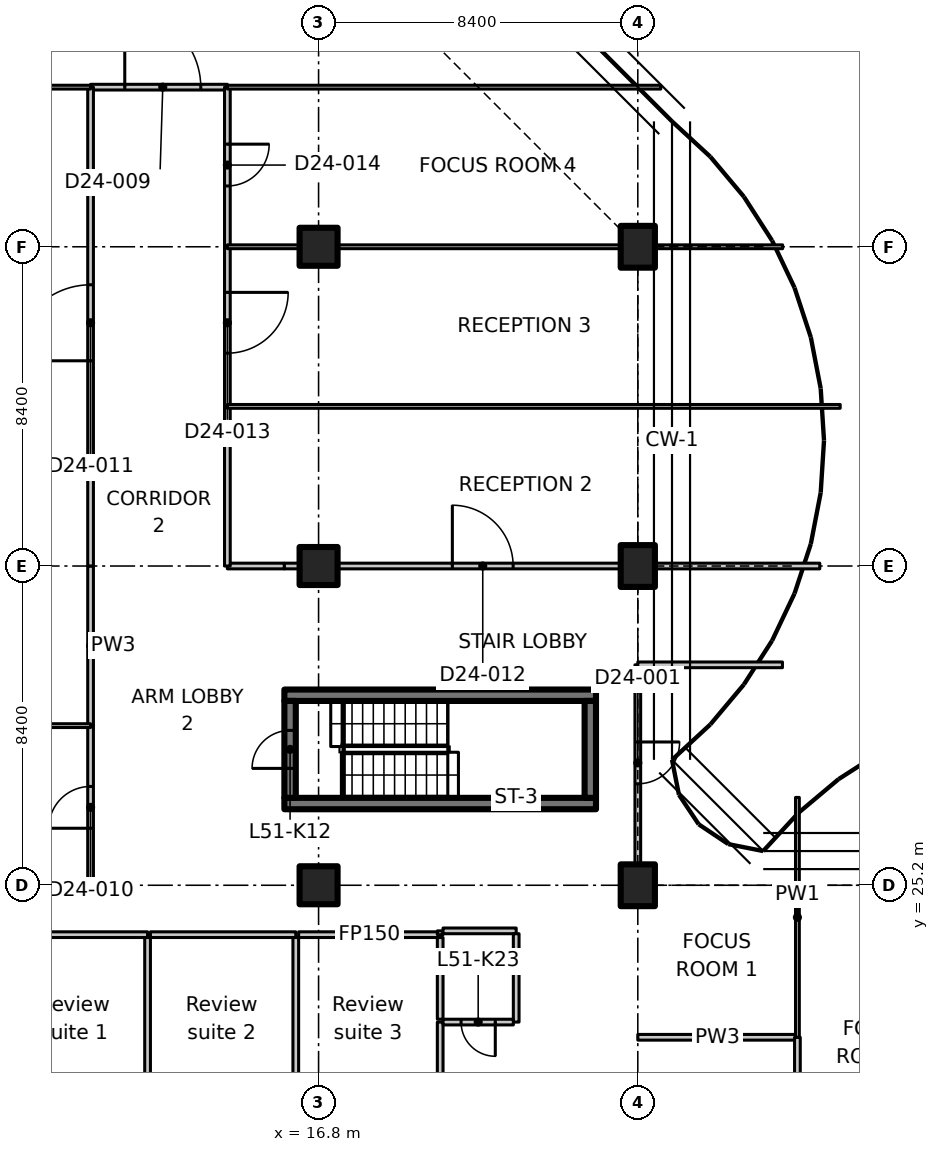
"""IFC4 building model, lengths in metres.
Left out: names, types, materials, properties, quantities, classifications, styles, units other than length and angle.
Written with IfcOpenShell. Run it as: python <this file> out.ifc"""

import sys

from ifc_helpers import new_model, si_unit, direction, frame, frame_2d, origin, origin_2d, place, context, subcontext, project, spatial, polyline, rectangle, outline, extrude, element, fill, save


model = new_model("IFC4")
c1 = context("Model", 3, precision=1e-05, world=origin(), true_north=direction((0.0, 1.0)))
c2 = subcontext(c1, "Body", "Model", "MODEL_VIEW")
j1 = project(units=[si_unit("LENGTHUNIT", "METRE"), si_unit("PLANEANGLEUNIT", "RADIAN")], contexts=[c1])
p1 = place(None, origin())
s1 = spatial("IfcSite", under=j1, at=p1, CompositionType="ELEMENT")
p2 = place(p1, origin())
s2 = spatial("IfcBuilding", under=s1, at=p2, CompositionType="ELEMENT")
p3 = place(p2, frame((0.0, 0.0, 202.8)))
s3 = spatial("IfcBuildingStorey", under=s2, at=p3, CompositionType="ELEMENT", Elevation=202.8)
for number, where, z_axis, x_axis in (
    (1, (16.8, 25.2, 0.0), (0.0, 0.0, 1.0), (1.0, 0.0, 0.0)),
    (2, (16.8, 33.6, 0.0), (0.0, 0.0, 1.0), (1.0, 0.0, 0.0)),
    (3, (16.8, 42.0, 0.0), (0.0, 0.0, 1.0), (1.0, 0.0, 0.0)),
):
    element("IfcColumn", number, at=place(p3, frame(where, z_axis=z_axis, x_axis=x_axis)), inside=s3, PredefinedType="COLUMN", context=c2, shape_type="SweptSolid", body=[
        extrude(rectangle(XDim=1.0, YDim=1.0, at=origin_2d()), origin(), (0.0, 0.0, 1.0), 3.3),
    ])
for number, where, z_axis, x_axis in (
    (4, (25.2, 25.2, 0.0), (0.0, 0.0, 1.0), (1.0, 0.0, 0.0)),
    (5, (25.2, 33.6, 0.0), (0.0, 0.0, 1.0), (1.0, 0.0, 0.0)),
    (6, (25.2, 42.0, 0.0), (0.0, 0.0, 1.0), (1.0, 0.0, 0.0)),
):
    element("IfcColumn", number, at=place(p3, frame(where, z_axis=z_axis, x_axis=x_axis)), inside=s3, PredefinedType="COLUMN", context=c2, shape_type="SweptSolid", body=[
        extrude(rectangle(XDim=0.9, YDim=1.1, at=origin_2d()), origin(), (0.0, 0.0, 1.0), 3.3),
    ])
for number, where, z_axis, x_axis in (
    (7, (15.9, 27.35, 0.0), (0.0, 0.0, 1.0), (1.0, 0.0, 0.0)),
    (8, (15.9, 30.2, 0.0), (0.0, 0.0, 1.0), (1.0, 0.0, 0.0)),
):
    element("IfcWall", number, at=place(p3, frame(where, z_axis=z_axis, x_axis=x_axis)), inside=s3, PredefinedType="SHEAR", context=c2, shape_type="SweptSolid", body=[
        extrude(rectangle(XDim=8.2, YDim=0.3, at=frame_2d((4.1, 0.0))), origin(), (0.0, 0.0, 1.0), 3.3),
    ])
p4 = place(p3, frame((16.05, 27.5, 0.0), z_axis=(0.0, 0.0, 1.0), x_axis=(0.0, 1.0, 0.0)))
e9 = element("IfcWall", 9, at=p4, inside=s3, PredefinedType="SHEAR", context=c2, shape_type="SweptSolid", body=[
    extrude(rectangle(XDim=2.55, YDim=0.3, at=frame_2d((1.275, 0.0))), origin(), (0.0, 0.0, 1.0), 3.3),
])
p5 = place(p4, frame((0.775, 0.0, 0.0)))
e10 = element("IfcOpeningElement", 10, at=p5, cuts=e9, PredefinedType="OPENING", context=c2, shape_type="SweptSolid", body=[
    extrude(rectangle(XDim=1.0, YDim=2.1, at=frame_2d((0.5, 1.05))), frame((0.0, 0.16, 0.0), z_axis=(0.0, -1.0, 0.0), x_axis=(1.0, 0.0, 0.0)), (0.0, 0.0, 1.0), 0.32),
])
p6 = place(p3, frame((23.95, 27.5, 0.0), z_axis=(0.0, 0.0, 1.0), x_axis=(0.0, 1.0, 0.0)))
e11 = element("IfcWall", 11, at=p6, inside=s3, PredefinedType="SHEAR", context=c2, shape_type="SweptSolid", body=[
    extrude(rectangle(XDim=2.55, YDim=0.3, at=frame_2d((1.275, 0.0))), origin(), (0.0, 0.0, 1.0), 3.3),
])
p7 = place(p3, frame((8.575, 23.9, 0.0), z_axis=(0.0, 0.0, 1.0), x_axis=(1.0, 0.0, 0.0)))
e12 = element("IfcWall", 12, at=p7, inside=s3, PredefinedType="PARTITIONING", context=c2, shape_type="SweptSolid", body=[
    extrude(rectangle(XDim=3.725, YDim=0.15, at=frame_2d((1.863, 0.0))), origin(), (0.0, 0.0, 1.0), 3.3),
])
p8 = place(p3, frame((12.3, 23.825, 0.0), z_axis=(0.0, 0.0, 1.0), x_axis=(0.0, -1.0, 0.0)))
e13 = element("IfcWall", 13, at=p8, inside=s3, PredefinedType="PARTITIONING", context=c2, shape_type="SweptSolid", body=[
    extrude(rectangle(XDim=4.35, YDim=0.15, at=frame_2d((2.175, 0.0))), origin(), (0.0, 0.0, 1.0), 3.3),
])
p9 = place(p3, frame((12.375, 23.9, 0.0), z_axis=(0.0, 0.0, 1.0), x_axis=(1.0, 0.0, 0.0)))
e14 = element("IfcWall", 14, at=p9, inside=s3, PredefinedType="PARTITIONING", context=c2, shape_type="SweptSolid", body=[
    extrude(rectangle(XDim=3.825, YDim=0.15, at=frame_2d((1.913, 0.0))), origin(), (0.0, 0.0, 1.0), 3.3),
])
p10 = place(p3, frame((20.0, 21.6, 0.0), z_axis=(0.0, 0.0, 1.0), x_axis=(0.0, -1.0, 0.0)))
e15 = element("IfcWall", 15, at=p10, inside=s3, PredefinedType="PARTITIONING", context=c2, shape_type="SweptSolid", body=[
    extrude(rectangle(XDim=2.2, YDim=0.15, at=frame_2d((1.1, 0.0))), origin(), (0.0, 0.0, 1.0), 3.3),
])
p11 = place(p3, frame((16.2, 23.825, 0.0), z_axis=(0.0, 0.0, 1.0), x_axis=(0.0, -1.0, 0.0)))
e16 = element("IfcWall", 16, at=p11, inside=s3, PredefinedType="PARTITIONING", context=c2, shape_type="SweptSolid", body=[
    extrude(rectangle(XDim=4.35, YDim=0.15, at=frame_2d((2.175, 0.0))), origin(), (0.0, 0.0, 1.0), 3.3),
])
p12 = place(p3, frame((16.275, 23.9, 0.0), z_axis=(0.0, 0.0, 1.0), x_axis=(1.0, 0.0, 0.0)))
e17 = element("IfcWall", 17, at=p12, inside=s3, PredefinedType="PARTITIONING", context=c2, shape_type="SweptSolid", body=[
    extrude(rectangle(XDim=3.725, YDim=0.15, at=frame_2d((1.863, 0.0))), origin(), (0.0, 0.0, 1.0), 3.3),
])
p13 = place(p3, frame((20.0, 23.9, 0.0), z_axis=(0.0, 0.0, 1.0), x_axis=(0.0, 1.0, 0.0)))
e18 = element("IfcWall", 18, at=p13, inside=s3, PredefinedType="PARTITIONING", context=c2, shape_type="SweptSolid", body=[
    extrude(rectangle(XDim=0.1, YDim=0.15, at=frame_2d((0.05, 0.0))), origin(), (0.0, 0.0, 1.0), 3.3),
])
p14 = place(p3, frame((20.075, 24.0, 0.0), z_axis=(0.0, 0.0, 1.0), x_axis=(1.0, 0.0, 0.0)))
e19 = element("IfcWall", 19, at=p14, inside=s3, PredefinedType="PARTITIONING", context=c2, shape_type="SweptSolid", body=[
    extrude(rectangle(XDim=1.925, YDim=0.15, at=frame_2d((0.962, 0.0))), origin(), (0.0, 0.0, 1.0), 3.3),
])
p15 = place(p3, frame((22.0, 23.925, 0.0), z_axis=(0.0, 0.0, 1.0), x_axis=(0.0, -1.0, 0.0)))
e20 = element("IfcWall", 20, at=p15, inside=s3, PredefinedType="PARTITIONING", context=c2, shape_type="SweptSolid", body=[
    extrude(rectangle(XDim=2.325, YDim=0.15, at=frame_2d((1.163, 0.0))), origin(), (0.0, 0.0, 1.0), 3.3),
])
p16 = place(p3, frame((21.925, 21.6, 0.0), z_axis=(0.0, 0.0, 1.0), x_axis=(-1.0, 0.0, 0.0)))
e21 = element("IfcWall", 21, at=p16, inside=s3, PredefinedType="PARTITIONING", context=c2, shape_type="SweptSolid", body=[
    extrude(rectangle(XDim=1.85, YDim=0.15, at=frame_2d((0.925, 0.0))), origin(), (0.0, 0.0, 1.0), 3.3),
])
p17 = place(p16, frame((0.475, 0.0, 0.0)))
e22 = element("IfcOpeningElement", 22, at=p17, cuts=e21, PredefinedType="OPENING", context=c2, shape_type="SweptSolid", body=[
    extrude(rectangle(XDim=0.9, YDim=2.1, at=frame_2d((0.45, 1.05))), frame((0.0, 0.085, 0.0), z_axis=(0.0, -1.0, 0.0), x_axis=(1.0, 0.0, 0.0)), (0.0, 0.0, 1.0), 0.17),
])
p18 = place(p3, frame((20.0, 21.675, 0.0), z_axis=(0.0, 0.0, 1.0), x_axis=(0.0, 1.0, 0.0)))
e23 = element("IfcWall", 23, at=p18, inside=s3, PredefinedType="PARTITIONING", context=c2, shape_type="SweptSolid", body=[
    extrude(rectangle(XDim=2.15, YDim=0.15, at=frame_2d((1.075, 0.0))), origin(), (0.0, 0.0, 1.0), 3.3),
])
p19 = place(p3, frame((25.2, 21.2, 0.0), z_axis=(0.0, 0.0, 1.0), x_axis=(1.0, 0.0, 0.0)))
e24 = element("IfcWall", 24, at=p19, inside=s3, PredefinedType="PARTITIONING", context=c2, shape_type="SweptSolid", body=[
    extrude(rectangle(XDim=4.2, YDim=0.15, at=frame_2d((2.1, 0.0))), origin(), (0.0, 0.0, 1.0), 3.28),
])
p20 = place(p3, frame((29.4, 21.2, 0.0), z_axis=(0.0, 0.0, 1.0), x_axis=(0.0, -1.0, 0.0)))
e25 = element("IfcWall", 25, at=p20, inside=s3, PredefinedType="PARTITIONING", context=c2, shape_type="SweptSolid", body=[
    extrude(rectangle(XDim=8.2, YDim=0.15, at=frame_2d((4.1, 0.0))), origin(), (0.0, 0.0, 1.0), 3.28),
])
p21 = place(p3, frame((29.4, 27.511, 0.0), z_axis=(0.0, 0.0, 1.0), x_axis=(0.0, -1.0, 0.0)))
e26 = element("IfcWall", 26, at=p21, inside=s3, PredefinedType="PARTITIONING", context=c2, shape_type="SweptSolid", body=[
    extrude(outline(polyline([(0.0, 0.0), (6.311, 0.0), (6.311, 3.28), (2.761, 3.28), (2.759, 2.93), (1.863, 2.93), (1.861, 3.28), (0.236, 3.28), (0.0, 3.28), (0.0, 0.0)])), frame((0.0, 0.05, 0.0), z_axis=(0.0, -1.0, 0.0), x_axis=(1.0, 0.0, 0.0)), (0.0, 0.0, 1.0), 0.1),
])
p22 = place(p3, frame((25.2, 31.0, 0.0), z_axis=(0.0, 0.0, 1.0), x_axis=(0.0, -1.0, 0.0)))
e27 = element("IfcWall", 27, at=p22, inside=s3, PredefinedType="PARTITIONING", context=c2, shape_type="SweptSolid", body=[
    extrude(outline(polyline([(0.0, 0.0), (5.23, 0.0), (5.23, 2.93), (0.0, 2.93), (0.0, 0.0)])), frame((0.0, 0.075, 0.0), z_axis=(0.0, -1.0, 0.0), x_axis=(1.0, 0.0, 0.0)), (0.0, 0.0, 1.0), 0.15),
])
p23 = place(p22, frame((2.03, 0.0, 0.0)))
e28 = element("IfcOpeningElement", 28, at=p23, cuts=e27, PredefinedType="OPENING", context=c2, shape_type="SweptSolid", body=[
    extrude(rectangle(XDim=1.1, YDim=2.1, at=frame_2d((0.55, 1.05))), frame((0.0, 0.085, 0.0), z_axis=(0.0, -1.0, 0.0), x_axis=(1.0, 0.0, 0.0)), (0.0, 0.0, 1.0), 0.17),
])
p24 = place(p3, frame((25.2, 31.0, 0.0), z_axis=(0.0, 0.0, 1.0), x_axis=(1.0, 0.0, 0.0)))
e29 = element("IfcWall", 29, at=p24, inside=s3, PredefinedType="PARTITIONING", context=c2, shape_type="SweptSolid", body=[
    extrude(rectangle(XDim=3.806, YDim=0.15, at=frame_2d((1.903, 0.0))), origin(), (0.0, 0.0, 1.0), 2.93),
])
p25 = place(p3, frame((10.8, 25.2, 0.0), z_axis=(0.0, 0.0, 1.0), x_axis=(0.0, 1.0, 0.0)))
e30 = element("IfcWall", 30, at=p25, inside=s3, PredefinedType="PARTITIONING", context=c2, shape_type="SweptSolid", body=[
    extrude(rectangle(XDim=4.2, YDim=0.15, at=frame_2d((2.1, 0.0))), origin(), (0.0, 0.0, 1.0), 3.28),
])
p26 = place(p25, frame((1.5, 0.0, 0.0)))
e31 = element("IfcOpeningElement", 31, at=p26, cuts=e30, PredefinedType="OPENING", context=c2, shape_type="SweptSolid", body=[
    extrude(rectangle(XDim=1.1, YDim=2.1, at=frame_2d((0.55, 1.05))), frame((0.0, 0.085, 0.0), z_axis=(0.0, -1.0, 0.0), x_axis=(1.0, 0.0, 0.0)), (0.0, 0.0, 1.0), 0.17),
])
p27 = place(p3, frame((10.8, 29.4, 0.0), z_axis=(0.0, 0.0, 1.0), x_axis=(0.0, 1.0, 0.0)))
e32 = element("IfcWall", 32, at=p27, inside=s3, PredefinedType="PARTITIONING", context=c2, shape_type="SweptSolid", body=[
    extrude(rectangle(XDim=4.2, YDim=0.15, at=frame_2d((2.1, 0.0))), origin(), (0.0, 0.0, 1.0), 3.28),
])
p28 = place(p3, frame((14.4, 33.6, 0.0), z_axis=(0.0, 0.0, 1.0), x_axis=(1.0, 0.0, 0.0)))
e33 = element("IfcWall", 33, at=p28, inside=s3, PredefinedType="PARTITIONING", context=c2, shape_type="SweptSolid", body=[
    extrude(rectangle(XDim=1.5, YDim=0.15, at=frame_2d((0.75, 0.0))), origin(), (0.0, 0.0, 1.0), 3.28),
])
p29 = place(p3, frame((15.9, 33.6, 0.0), z_axis=(0.0, 0.0, 1.0), x_axis=(1.0, 0.0, 0.0)))
e34 = element("IfcWall", 34, at=p29, inside=s3, PredefinedType="PARTITIONING", context=c2, shape_type="SweptSolid", body=[
    extrude(rectangle(XDim=0.38, YDim=0.15, at=frame_2d((0.19, 0.0))), origin(), (0.0, 0.0, 1.0), 3.28),
])
p30 = place(p3, frame((17.32, 33.6, 0.0), z_axis=(0.0, 0.0, 1.0), x_axis=(1.0, 0.0, 0.0)))
e35 = element("IfcWall", 35, at=p30, inside=s3, PredefinedType="PARTITIONING", context=c2, shape_type="SweptSolid", body=[
    extrude(rectangle(XDim=7.41, YDim=0.15, at=frame_2d((3.705, 0.0))), origin(), (0.0, 0.0, 1.0), 3.28),
])
p31 = place(p30, frame((3.0, 0.0, 0.0)))
e36 = element("IfcOpeningElement", 36, at=p31, cuts=e35, PredefinedType="OPENING", context=c2, shape_type="SweptSolid", body=[
    extrude(rectangle(XDim=1.6, YDim=2.1, at=frame_2d((0.8, 1.05))), frame((0.0, 0.085, 0.0), z_axis=(0.0, -1.0, 0.0), x_axis=(1.0, 0.0, 0.0)), (0.0, 0.0, 1.0), 0.17),
])
p32 = place(p3, frame((25.67, 33.6, 0.0), z_axis=(0.0, 0.0, 1.0), x_axis=(1.0, 0.0, 0.0)))
e37 = element("IfcWall", 37, at=p32, inside=s3, PredefinedType="PARTITIONING", context=c2, shape_type="SweptSolid", body=[
    extrude(rectangle(XDim=4.318, YDim=0.15, at=frame_2d((2.159, 0.0))), origin(), (0.0, 0.0, 1.0), 2.93),
])
p33 = place(p3, frame((10.8, 46.2, 0.0), z_axis=(0.0, 0.0, 1.0), x_axis=(1.0, 0.0, 0.0)))
e38 = element("IfcWall", 38, at=p33, inside=s3, PredefinedType="PARTITIONING", context=c2, shape_type="SweptSolid", body=[
    extrude(rectangle(XDim=3.6, YDim=0.15, at=frame_2d((1.8, 0.0))), origin(), (0.0, 0.0, 1.0), 3.28),
])
p34 = place(p33, frame((0.9, 0.0, 0.0)))
e39 = element("IfcOpeningElement", 39, at=p34, cuts=e38, PredefinedType="OPENING", context=c2, shape_type="SweptSolid", body=[
    extrude(rectangle(XDim=2.0, YDim=2.4, at=frame_2d((1.0, 1.2))), frame((0.0, 0.085, 0.0), z_axis=(0.0, -1.0, 0.0), x_axis=(1.0, 0.0, 0.0)), (0.0, 0.0, 1.0), 0.17),
])
p35 = place(p3, frame((10.8, 33.6, 0.0), z_axis=(0.0, 0.0, 1.0), x_axis=(0.0, 1.0, 0.0)))
e40 = element("IfcWall", 40, at=p35, inside=s3, PredefinedType="PARTITIONING", context=c2, shape_type="SweptSolid", body=[
    extrude(rectangle(XDim=12.6, YDim=0.15, at=frame_2d((6.3, 0.0))), origin(), (0.0, 0.0, 1.0), 3.28),
])
p36 = place(p35, frame((5.4, 0.0, 0.0)))
e41 = element("IfcOpeningElement", 41, at=p36, cuts=e40, PredefinedType="OPENING", context=c2, shape_type="SweptSolid", body=[
    extrude(rectangle(XDim=2.0, YDim=2.4, at=frame_2d((1.0, 1.2))), frame((0.0, 0.085, 0.0), z_axis=(0.0, -1.0, 0.0), x_axis=(1.0, 0.0, 0.0)), (0.0, 0.0, 1.0), 0.17),
])
p37 = place(p3, frame((14.4, 37.8, 0.0), z_axis=(0.0, 0.0, 1.0), x_axis=(0.0, -1.0, 0.0)))
e42 = element("IfcWall", 42, at=p37, inside=s3, PredefinedType="PARTITIONING", context=c2, shape_type="SweptSolid", body=[
    extrude(rectangle(XDim=4.2, YDim=0.15, at=frame_2d((2.1, 0.0))), origin(), (0.0, 0.0, 1.0), 3.28),
])
p38 = place(p3, frame((14.4, 42.0, 0.0), z_axis=(0.0, 0.0, 1.0), x_axis=(0.0, -1.0, 0.0)))
e43 = element("IfcWall", 43, at=p38, inside=s3, PredefinedType="PARTITIONING", context=c2, shape_type="SweptSolid", body=[
    extrude(rectangle(XDim=4.2, YDim=0.15, at=frame_2d((2.1, 0.0))), origin(), (0.0, 0.0, 1.0), 3.28),
])
p39 = place(p38, frame((1.2, 0.0, 0.0)))
e44 = element("IfcOpeningElement", 44, at=p39, cuts=e43, PredefinedType="OPENING", context=c2, shape_type="SweptSolid", body=[
    extrude(rectangle(XDim=1.6, YDim=2.1, at=frame_2d((0.8, 1.05))), frame((0.0, 0.085, 0.0), z_axis=(0.0, -1.0, 0.0), x_axis=(1.0, 0.0, 0.0)), (0.0, 0.0, 1.0), 0.17),
])
p40 = place(p3, frame((14.4, 46.2, 0.0), z_axis=(0.0, 0.0, 1.0), x_axis=(0.0, -1.0, 0.0)))
e45 = element("IfcWall", 45, at=p40, inside=s3, PredefinedType="PARTITIONING", context=c2, shape_type="SweptSolid", body=[
    extrude(rectangle(XDim=4.2, YDim=0.15, at=frame_2d((2.1, 0.0))), origin(), (0.0, 0.0, 1.0), 3.28),
])
p41 = place(p40, frame((1.5, 0.0, 0.0)))
e46 = element("IfcOpeningElement", 46, at=p41, cuts=e45, PredefinedType="OPENING", context=c2, shape_type="SweptSolid", body=[
    extrude(rectangle(XDim=1.1, YDim=2.1, at=frame_2d((0.55, 1.05))), frame((0.0, 0.085, 0.0), z_axis=(0.0, -1.0, 0.0), x_axis=(1.0, 0.0, 0.0)), (0.0, 0.0, 1.0), 0.17),
])
p42 = place(p3, frame((10.8, 46.2, 0.0), z_axis=(0.0, 0.0, 1.0), x_axis=(-1.0, 0.0, 0.0)))
e47 = element("IfcWall", 47, at=p42, inside=s3, PredefinedType="PARTITIONING", context=c2, shape_type="SweptSolid", body=[
    extrude(outline(polyline([(0.0, 0.0), (6.374, 0.0), (6.374, 3.28), (6.3, 3.28), (5.65, 3.28), (5.648, 2.93), (4.752, 2.93), (4.75, 3.28), (0.0, 3.28), (0.0, 0.0)])), frame((0.0, 0.05, 0.0), z_axis=(0.0, -1.0, 0.0), x_axis=(1.0, 0.0, 0.0)), (0.0, 0.0, 1.0), 0.1),
])
p43 = place(p3, frame((25.805, 46.2, 0.0), z_axis=(0.0, 0.0, 1.0), x_axis=(-1.0, 0.0, 0.0)))
e48 = element("IfcWall", 48, at=p43, inside=s3, PredefinedType="PARTITIONING", context=c2, shape_type="SweptSolid", body=[
    extrude(outline(polyline([(0.0, 0.0), (11.406, 0.0), (11.406, 3.28), (5.471, 3.28), (5.469, 2.93), (4.142, 2.93), (4.14, 3.28), (0.406, 3.28), (0.0, 3.28), (0.0, 0.0)])), frame((0.0, 0.05, 0.0), z_axis=(0.0, -1.0, 0.0), x_axis=(1.0, 0.0, 0.0)), (0.0, 0.0, 1.0), 0.1),
])
p44 = place(p3, frame((-1.1, 29.4, 0.0), z_axis=(0.0, 0.0, 1.0), x_axis=(1.0, 0.0, 0.0)))
e49 = element("IfcWall", 49, at=p44, inside=s3, PredefinedType="PARTITIONING", context=c2, shape_type="SweptSolid", body=[
    extrude(outline(polyline([(0.0, 0.0), (11.9, 0.0), (11.9, 3.28), (1.55, 3.28), (1.548, 2.93), (0.652, 2.93), (0.65, 3.28), (0.0, 3.28), (0.0, 0.0)])), frame((0.0, 0.05, 0.0), z_axis=(0.0, -1.0, 0.0), x_axis=(1.0, 0.0, 0.0)), (0.0, 0.0, 1.0), 0.1),
])
p45 = place(p3, frame((14.4, 37.8, 0.0), z_axis=(0.0, 0.0, 1.0), x_axis=(1.0, 0.0, 0.0)))
e50 = element("IfcWall", 50, at=p45, inside=s3, PredefinedType="PARTITIONING", context=c2, shape_type="SweptSolid", body=[
    extrude(outline(polyline([(0.0, 0.0), (16.126, 0.0), (16.126, 3.28), (15.843, 3.28), (11.25, 3.28), (11.248, 2.93), (10.352, 2.93), (10.35, 3.28), (0.0, 3.28), (0.0, 0.0)])), frame((0.0, 0.05, 0.0), z_axis=(0.0, -1.0, 0.0), x_axis=(1.0, 0.0, 0.0)), (0.0, 0.0, 1.0), 0.1),
])
p46 = place(p3, frame((14.4, 42.0, 0.0), z_axis=(0.0, 0.0, 1.0), x_axis=(1.0, 0.0, 0.0)))
e51 = element("IfcWall", 51, at=p46, inside=s3, PredefinedType="PARTITIONING", context=c2, shape_type="SweptSolid", body=[
    extrude(rectangle(XDim=1.88, YDim=0.1, at=frame_2d((0.94, 0.0))), origin(), (0.0, 0.0, 1.0), 3.28),
])
p47 = place(p3, frame((17.32, 42.0, 0.0), z_axis=(0.0, 0.0, 1.0), x_axis=(1.0, 0.0, 0.0)))
e52 = element("IfcWall", 52, at=p47, inside=s3, PredefinedType="PARTITIONING", context=c2, shape_type="SweptSolid", body=[
    extrude(outline(polyline([(0.0, 0.0), (7.41, 0.0), (7.41, 2.93), (7.216, 2.93), (7.214, 3.28), (0.0, 3.28), (0.0, 0.0)])), frame((0.0, 0.05, 0.0), z_axis=(0.0, -1.0, 0.0), x_axis=(1.0, 0.0, 0.0)), (0.0, 0.0, 1.0), 0.1),
])
p48 = place(p3, frame((25.67, 42.0, 0.0), z_axis=(0.0, 0.0, 1.0), x_axis=(1.0, 0.0, 0.0)))
e53 = element("IfcWall", 53, at=p48, inside=s3, PredefinedType="PARTITIONING", context=c2, shape_type="SweptSolid", body=[
    extrude(rectangle(XDim=3.342, YDim=0.1, at=frame_2d((1.671, 0.0))), origin(), (0.0, 0.0, 1.0), 2.93),
])
p49 = place(p5, origin())
e54 = element("IfcDoor", 54, at=p49, inside=s3, OperationType="SINGLE_SWING_RIGHT", PredefinedType="DOOR", context=c2, shape_type="SweptSolid", body=[
    extrude(rectangle(XDim=1.0, YDim=2.1, at=frame_2d((0.5, 1.05))), frame((0.0, 0.025, 0.0), z_axis=(0.0, -1.0, 0.0), x_axis=(1.0, 0.0, 0.0)), (0.0, 0.0, 1.0), 0.05),
])
fill(e10, e54)
p50 = place(p17, origin())
e55 = element("IfcDoor", 55, at=p50, inside=s3, OperationType="SINGLE_SWING_LEFT", PredefinedType="DOOR", context=c2, shape_type="SweptSolid", body=[
    extrude(rectangle(XDim=0.9, YDim=2.1, at=frame_2d((0.45, 1.05))), frame((0.0, 0.025, 0.0), z_axis=(0.0, -1.0, 0.0), x_axis=(1.0, 0.0, 0.0)), (0.0, 0.0, 1.0), 0.05),
])
fill(e22, e55)
p51 = place(p23, origin())
e56 = element("IfcDoor", 56, at=p51, inside=s3, OperationType="SINGLE_SWING_RIGHT", PredefinedType="DOOR", context=c2, shape_type="SweptSolid", body=[
    extrude(rectangle(XDim=1.1, YDim=2.1, at=frame_2d((0.55, 1.05))), frame((0.0, 0.025, 0.0), z_axis=(0.0, -1.0, 0.0), x_axis=(1.0, 0.0, 0.0)), (0.0, 0.0, 1.0), 0.05),
])
fill(e28, e56)
p52 = place(p34, origin())
e57 = element("IfcDoor", 57, at=p52, inside=s3, OperationType="DOUBLE_DOOR_SINGLE_SWING", PredefinedType="DOOR", context=c2, shape_type="SweptSolid", body=[
    extrude(rectangle(XDim=2.0, YDim=2.4, at=frame_2d((1.0, 1.2))), frame((0.0, 0.025, 0.0), z_axis=(0.0, -1.0, 0.0), x_axis=(1.0, 0.0, 0.0)), (0.0, 0.0, 1.0), 0.05),
])
fill(e39, e57)
p53 = place(p26, origin())
e58 = element("IfcDoor", 58, at=p53, inside=s3, OperationType="SINGLE_SWING_LEFT", PredefinedType="DOOR", context=c2, shape_type="SweptSolid", body=[
    extrude(rectangle(XDim=1.1, YDim=2.1, at=frame_2d((0.55, 1.05))), frame((0.0, 0.025, 0.0), z_axis=(0.0, -1.0, 0.0), x_axis=(1.0, 0.0, 0.0)), (0.0, 0.0, 1.0), 0.05),
])
fill(e31, e58)
p54 = place(p36, origin())
e59 = element("IfcDoor", 59, at=p54, inside=s3, OperationType="DOUBLE_DOOR_SINGLE_SWING", PredefinedType="DOOR", context=c2, shape_type="SweptSolid", body=[
    extrude(rectangle(XDim=2.0, YDim=2.4, at=frame_2d((1.0, 1.2))), frame((0.0, 0.025, 0.0), z_axis=(0.0, -1.0, 0.0), x_axis=(1.0, 0.0, 0.0)), (0.0, 0.0, 1.0), 0.05),
])
fill(e41, e59)
p55 = place(p31, origin())
e60 = element("IfcDoor", 60, at=p55, inside=s3, OperationType="DOUBLE_DOOR_SINGLE_SWING", PredefinedType="DOOR", context=c2, shape_type="SweptSolid", body=[
    extrude(rectangle(XDim=1.6, YDim=2.1, at=frame_2d((0.8, 1.05))), frame((0.0, 0.025, 0.0), z_axis=(0.0, -1.0, 0.0), x_axis=(1.0, 0.0, 0.0)), (0.0, 0.0, 1.0), 0.05),
])
fill(e36, e60)
p56 = place(p39, origin())
e61 = element("IfcDoor", 61, at=p56, inside=s3, OperationType="DOUBLE_DOOR_SINGLE_SWING", PredefinedType="DOOR", context=c2, shape_type="SweptSolid", body=[
    extrude(rectangle(XDim=1.6, YDim=2.1, at=frame_2d((0.8, 1.05))), frame((0.0, 0.025, 0.0), z_axis=(0.0, -1.0, 0.0), x_axis=(1.0, 0.0, 0.0)), (0.0, 0.0, 1.0), 0.05),
])
fill(e44, e61)
p57 = place(p41, origin())
e62 = element("IfcDoor", 62, at=p57, inside=s3, OperationType="SINGLE_SWING_LEFT", PredefinedType="DOOR", context=c2, shape_type="SweptSolid", body=[
    extrude(rectangle(XDim=1.1, YDim=2.1, at=frame_2d((0.55, 1.05))), frame((0.0, 0.025, 0.0), z_axis=(0.0, -1.0, 0.0), x_axis=(1.0, 0.0, 0.0)), (0.0, 0.0, 1.0), 0.05),
])
fill(e46, e62)
save(model, sys.argv[1])
